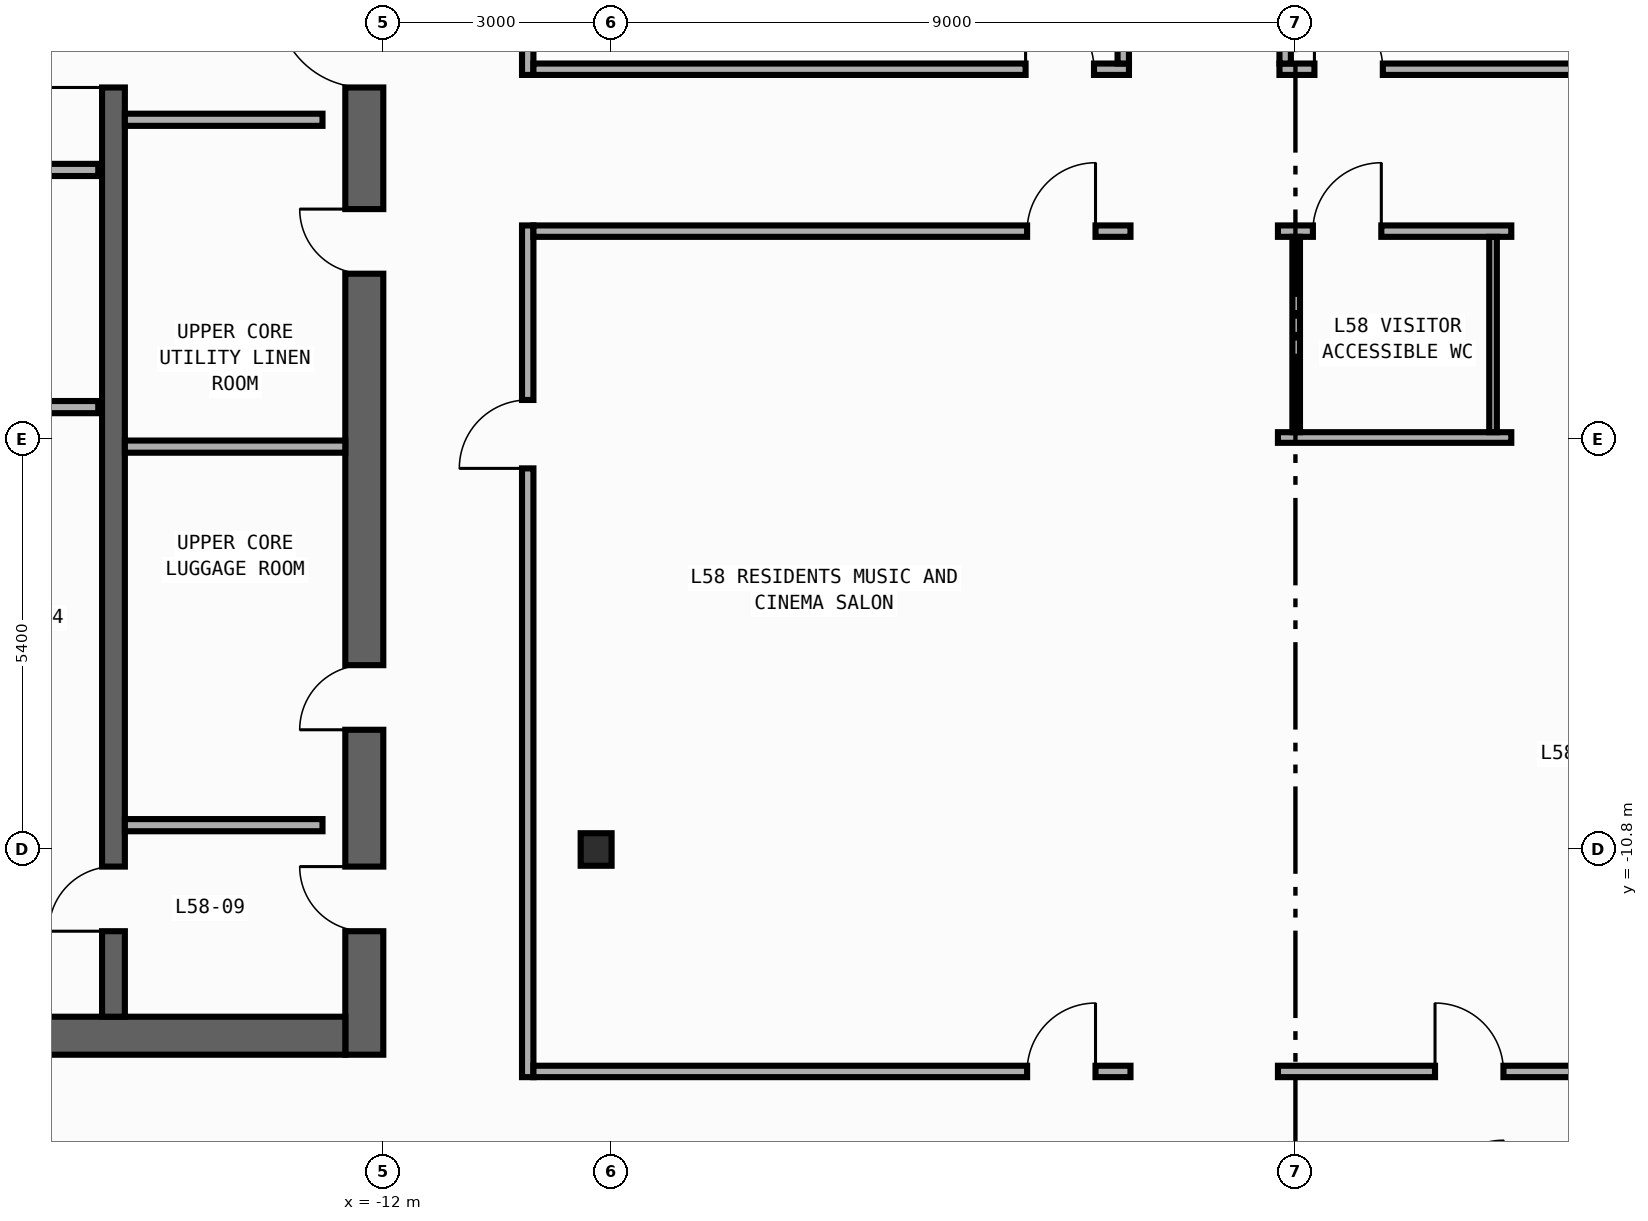
"""IFC4 building model, lengths in metres.
Left out: names, types, materials, properties, quantities, classifications, styles, units other than length and angle.
Written with IfcOpenShell. Run it as: python <this file> out.ifc"""

import sys

from ifc_helpers import new_model, si_unit, direction, frame, frame_2d, origin, origin_2d, place, context, subcontext, project, spatial, rectangle, i_section, extrude, element, fill, save


model = new_model("IFC4")
c1 = context("Model", 3, precision=1e-05, world=origin(), true_north=direction((0.0, 1.0)))
c2 = subcontext(c1, "Body", "Model", "MODEL_VIEW")
j1 = project(units=[si_unit("LENGTHUNIT", "METRE"), si_unit("PLANEANGLEUNIT", "RADIAN")], contexts=[c1])
p1 = place(None, origin())
s1 = spatial("IfcSite", under=j1, at=p1, CompositionType="ELEMENT")
p2 = place(p1, origin())
s2 = spatial("IfcBuilding", under=s1, at=p2, CompositionType="ELEMENT")
p3 = place(p2, frame((0.0, 0.0, 247.6)))
s3 = spatial("IfcBuildingStorey", under=s2, at=p3, CompositionType="ELEMENT", Elevation=247.6)
p4 = place(p3, frame((-12.25, -13.5, 0.0), z_axis=(0.0, 0.0, 1.0), x_axis=(0.0, 1.0, 0.0)))
e1 = element("IfcWall", 1, at=p4, inside=s3, PredefinedType="SHEAR", context=c2, shape_type="SweptSolid", body=[
    extrude(rectangle(XDim=27.0, YDim=0.5, at=frame_2d((13.5, 0.0))), origin(), (0.0, 0.0, 1.0), 3.34),
])
p5 = place(p4, frame((15.175, 0.0, 0.0)))
e2 = element("IfcOpeningElement", 2, at=p5, cuts=e1, PredefinedType="OPENING", context=c2, shape_type="SweptSolid", body=[
    extrude(rectangle(XDim=0.85, YDim=2.1, at=frame_2d((0.425, 1.05))), frame((0.0, 0.26, 0.0), z_axis=(0.0, -1.0, 0.0), x_axis=(1.0, 0.0, 0.0)), (0.0, 0.0, 1.0), 0.52),
])
p6 = place(p4, frame((21.275, 0.0, 0.0)))
e3 = element("IfcOpeningElement", 3, at=p6, cuts=e1, PredefinedType="OPENING", context=c2, shape_type="SweptSolid", body=[
    extrude(rectangle(XDim=0.85, YDim=2.1, at=frame_2d((0.425, 1.05))), frame((0.0, 0.26, 0.0), z_axis=(0.0, -1.0, 0.0), x_axis=(1.0, 0.0, 0.0)), (0.0, 0.0, 1.0), 0.52),
])
p7 = place(p4, frame((4.275, 0.0, 0.0)))
e4 = element("IfcOpeningElement", 4, at=p7, cuts=e1, PredefinedType="OPENING", context=c2, shape_type="SweptSolid", body=[
    extrude(rectangle(XDim=0.85, YDim=2.1, at=frame_2d((0.425, 1.05))), frame((0.0, 0.26, 0.0), z_axis=(0.0, -1.0, 0.0), x_axis=(1.0, 0.0, 0.0)), (0.0, 0.0, 1.0), 0.52),
])
p8 = place(p4, frame((10.275, 0.0, 0.0)))
e5 = element("IfcOpeningElement", 5, at=p8, cuts=e1, PredefinedType="OPENING", context=c2, shape_type="SweptSolid", body=[
    extrude(rectangle(XDim=0.85, YDim=2.1, at=frame_2d((0.425, 1.05))), frame((0.0, 0.26, 0.0), z_axis=(0.0, -1.0, 0.0), x_axis=(1.0, 0.0, 0.0)), (0.0, 0.0, 1.0), 0.52),
])
p9 = place(p4, frame((12.725, 0.0, 0.0)))
e6 = element("IfcOpeningElement", 6, at=p9, cuts=e1, PredefinedType="OPENING", context=c2, shape_type="SweptSolid", body=[
    extrude(rectangle(XDim=1.15, YDim=2.2, at=frame_2d((0.575, 1.1))), frame((0.0, 0.26, 0.0), z_axis=(0.0, -1.0, 0.0), x_axis=(1.0, 0.0, 0.0)), (0.0, 0.0, 1.0), 0.52),
])
p10 = place(p4, frame((1.625, 0.0, 0.0)))
e7 = element("IfcOpeningElement", 7, at=p10, cuts=e1, PredefinedType="OPENING", context=c2, shape_type="SweptSolid", body=[
    extrude(rectangle(XDim=0.85, YDim=2.1, at=frame_2d((0.425, 1.05))), frame((0.0, 0.26, 0.0), z_axis=(0.0, -1.0, 0.0), x_axis=(1.0, 0.0, 0.0)), (0.0, 0.0, 1.0), 0.52),
])
p11 = place(p3, frame((-19.9, -13.25, 0.0), z_axis=(0.0, 0.0, 1.0), x_axis=(1.0, 0.0, 0.0)))
e8 = element("IfcWall", 8, at=p11, inside=s3, PredefinedType="SHEAR", context=c2, shape_type="SweptSolid", body=[
    extrude(rectangle(XDim=7.4, YDim=0.5, at=frame_2d((3.7, 0.0))), origin(), (0.0, 0.0, 1.0), 3.34),
])
p12 = place(p3, frame((-15.55, -13.0, 0.0), z_axis=(0.0, 0.0, 1.0), x_axis=(0.0, 1.0, 0.0)))
e9 = element("IfcWall", 9, at=p12, inside=s3, PredefinedType="SHEAR", context=c2, shape_type="SweptSolid", body=[
    extrude(rectangle(XDim=26.0, YDim=0.3, at=frame_2d((13.0, 0.0))), origin(), (0.0, 0.0, 1.0), 3.34),
])
p13 = place(p12, frame((12.225, 0.0, 0.0)))
e10 = element("IfcOpeningElement", 10, at=p13, cuts=e9, PredefinedType="OPENING", context=c2, shape_type="SweptSolid", body=[
    extrude(rectangle(XDim=1.15, YDim=2.2, at=frame_2d((0.575, 1.1))), frame((0.0, 0.16, 0.0), z_axis=(0.0, -1.0, 0.0), x_axis=(1.0, 0.0, 0.0)), (0.0, 0.0, 1.0), 0.32),
])
p14 = place(p12, frame((1.125, 0.0, 0.0)))
e11 = element("IfcOpeningElement", 11, at=p14, cuts=e9, PredefinedType="OPENING", context=c2, shape_type="SweptSolid", body=[
    extrude(rectangle(XDim=0.85, YDim=2.1, at=frame_2d((0.425, 1.05))), frame((0.0, 0.16, 0.0), z_axis=(0.0, -1.0, 0.0), x_axis=(1.0, 0.0, 0.0)), (0.0, 0.0, 1.0), 0.32),
])
p15 = place(p3, frame((-9.2, -10.8, 0.0), z_axis=(0.0, 0.0, 1.0), x_axis=(1.0, 0.0, 0.0)))
e12 = element("IfcColumn", 12, at=p15, inside=s3, PredefinedType="COLUMN", context=c2, shape_type="SweptSolid", body=[
    extrude(i_section(OverallWidth=0.407, OverallDepth=0.428, WebThickness=0.02, FlangeThickness=0.035, FilletRadius=0.022, at=origin_2d()), origin(), (0.0, 0.0, 1.0), 3.6),
])
p16 = place(p3, frame((-19.55, -1.86, 0.0), z_axis=(0.0, 0.0, 1.0), x_axis=(1.0, 0.0, 0.0)))
e13 = element("IfcWall", 13, at=p16, inside=s3, PredefinedType="STANDARD", context=c2, shape_type="SweptSolid", body=[
    extrude(rectangle(XDim=3.8, YDim=0.16, at=frame_2d((1.9, 0.0))), origin(), (0.0, 0.0, 1.0), 3.34),
])
p17 = place(p16, frame((1.18, 0.0, 0.0)))
e14 = element("IfcOpeningElement", 14, at=p17, cuts=e13, PredefinedType="OPENING", context=c2, shape_type="SweptSolid", body=[
    extrude(rectangle(XDim=1.15, YDim=2.2, at=frame_2d((0.575, 1.1))), frame((0.0, 0.09, 0.0), z_axis=(0.0, -1.0, 0.0), x_axis=(1.0, 0.0, 0.0)), (0.0, 0.0, 1.0), 0.18),
])
p18 = place(p3, frame((-19.55, -4.98, 0.0), z_axis=(0.0, 0.0, 1.0), x_axis=(1.0, 0.0, 0.0)))
e15 = element("IfcWall", 15, at=p18, inside=s3, PredefinedType="STANDARD", context=c2, shape_type="SweptSolid", body=[
    extrude(rectangle(XDim=3.8, YDim=0.16, at=frame_2d((1.9, 0.0))), origin(), (0.0, 0.0, 1.0), 3.34),
])
for number, where, z_axis, x_axis in (
    (16, (-15.4, -1.2, 0.0), (0.0, 0.0, 1.0), (1.0, 0.0, 0.0)),
    (17, (-15.4, -10.48, 0.0), (0.0, 0.0, 1.0), (1.0, 0.0, 0.0)),
):
    element("IfcWall", number, at=place(p3, frame(where, z_axis=z_axis, x_axis=x_axis)), inside=s3, PredefinedType="STANDARD", context=c2, shape_type="SweptSolid", body=[
        extrude(rectangle(XDim=2.6, YDim=0.16, at=frame_2d((1.3, 0.0))), origin(), (0.0, 0.0, 1.0), 3.34),
    ])
p19 = place(p3, frame((-15.4, -5.5, 0.0), z_axis=(0.0, 0.0, 1.0), x_axis=(1.0, 0.0, 0.0)))
e18 = element("IfcWall", 18, at=p19, inside=s3, PredefinedType="PARTITIONING", context=c2, shape_type="SweptSolid", body=[
    extrude(rectangle(XDim=2.9, YDim=0.16, at=frame_2d((1.45, 0.0))), origin(), (0.0, 0.0, 1.0), 3.34),
])
p20 = place(p3, frame((-10.1, -0.61, 0.0), z_axis=(0.0, 0.0, 1.0), x_axis=(0.0, 1.0, 0.0)))
e19 = element("IfcWall", 19, at=p20, inside=s3, PredefinedType="PARTITIONING", context=c2, shape_type="SweptSolid", body=[
    extrude(rectangle(XDim=14.405, YDim=0.15, at=frame_2d((7.203, 0.0))), origin(), (0.0, 0.0, 1.0), 3.34),
])
p21 = place(p20, frame((5.535, 0.0, 0.0)))
e20 = element("IfcOpeningElement", 20, at=p21, cuts=e19, PredefinedType="OPENING", context=c2, shape_type="SweptSolid", body=[
    extrude(rectangle(XDim=0.9, YDim=2.15, at=frame_2d((0.45, 1.075))), frame((0.0, 0.085, 0.0), z_axis=(0.0, -1.0, 0.0), x_axis=(1.0, 0.0, 0.0)), (0.0, 0.0, 1.0), 0.17),
])
p22 = place(p3, frame((-10.1, -13.795, 0.0), z_axis=(0.0, 0.0, 1.0), x_axis=(0.0, 1.0, 0.0)))
e21 = element("IfcWall", 21, at=p22, inside=s3, PredefinedType="PARTITIONING", context=c2, shape_type="SweptSolid", body=[
    extrude(rectangle(XDim=11.205, YDim=0.15, at=frame_2d((5.603, 0.0))), origin(), (0.0, 0.0, 1.0), 3.34),
])
p23 = place(p22, frame((8.009, 0.0, 0.0)))
e22 = element("IfcOpeningElement", 22, at=p23, cuts=e21, PredefinedType="OPENING", context=c2, shape_type="SweptSolid", body=[
    extrude(rectangle(XDim=0.9, YDim=2.15, at=frame_2d((0.45, 1.075))), frame((0.0, 0.085, 0.0), z_axis=(0.0, -1.0, 0.0), x_axis=(1.0, 0.0, 0.0)), (0.0, 0.0, 1.0), 0.17),
])
p24 = place(p3, frame((-10.025, -0.535, 0.0), z_axis=(0.0, 0.0, 1.0), x_axis=(1.0, 0.0, 0.0)))
e23 = element("IfcWall", 23, at=p24, inside=s3, PredefinedType="PARTITIONING", context=c2, shape_type="SweptSolid", body=[
    extrude(rectangle(XDim=7.835, YDim=0.15, at=frame_2d((3.917, 0.0))), origin(), (0.0, 0.0, 1.0), 3.34),
])
p25 = place(p24, frame((6.475, 0.0, 0.0)))
e24 = element("IfcOpeningElement", 24, at=p25, cuts=e23, PredefinedType="OPENING", context=c2, shape_type="SweptSolid", body=[
    extrude(rectangle(XDim=0.9, YDim=2.15, at=frame_2d((0.45, 1.075))), frame((0.0, 0.085, 0.0), z_axis=(0.0, -1.0, 0.0), x_axis=(1.0, 0.0, 0.0)), (0.0, 0.0, 1.0), 0.17),
])
p26 = place(p3, frame((-10.025, -2.665, 0.0), z_axis=(0.0, 0.0, 1.0), x_axis=(1.0, 0.0, 0.0)))
e25 = element("IfcWall", 25, at=p26, inside=s3, PredefinedType="PARTITIONING", context=c2, shape_type="SweptSolid", body=[
    extrude(rectangle(XDim=7.855, YDim=0.15, at=frame_2d((3.927, 0.0))), origin(), (0.0, 0.0, 1.0), 3.34),
])
p27 = place(p26, frame((6.495, 0.0, 0.0)))
e26 = element("IfcOpeningElement", 26, at=p27, cuts=e25, PredefinedType="OPENING", context=c2, shape_type="SweptSolid", body=[
    extrude(rectangle(XDim=0.9, YDim=2.15, at=frame_2d((0.45, 1.075))), frame((0.0, 0.085, 0.0), z_axis=(0.0, -1.0, 0.0), x_axis=(1.0, 0.0, 0.0)), (0.0, 0.0, 1.0), 0.17),
])
p28 = place(p3, frame((-0.21, -0.535, 0.0), z_axis=(0.0, 0.0, 1.0), x_axis=(1.0, 0.0, 0.0)))
e27 = element("IfcWall", 27, at=p28, inside=s3, PredefinedType="PARTITIONING", context=c2, shape_type="SweptSolid", body=[
    extrude(rectangle(XDim=10.235, YDim=0.15, at=frame_2d((5.117, 0.0))), origin(), (0.0, 0.0, 1.0), 3.34),
])
p29 = place(p28, frame((0.46, 0.0, 0.0)))
e28 = element("IfcOpeningElement", 28, at=p29, cuts=e27, PredefinedType="OPENING", context=c2, shape_type="SweptSolid", body=[
    extrude(rectangle(XDim=0.9, YDim=2.15, at=frame_2d((0.45, 1.075))), frame((0.0, 0.085, 0.0), z_axis=(0.0, -1.0, 0.0), x_axis=(1.0, 0.0, 0.0)), (0.0, 0.0, 1.0), 0.17),
])
p30 = place(p3, frame((-0.23, -2.665, 0.0), z_axis=(0.0, 0.0, 1.0), x_axis=(1.0, 0.0, 0.0)))
e29 = element("IfcWall", 29, at=p30, inside=s3, PredefinedType="PARTITIONING", context=c2, shape_type="SweptSolid", body=[
    extrude(rectangle(XDim=3.07, YDim=0.15, at=frame_2d((1.535, 0.0))), origin(), (0.0, 0.0, 1.0), 3.34),
])
p31 = place(p30, frame((0.46, 0.0, 0.0)))
e30 = element("IfcOpeningElement", 30, at=p31, cuts=e29, PredefinedType="OPENING", context=c2, shape_type="SweptSolid", body=[
    extrude(rectangle(XDim=0.9, YDim=2.15, at=frame_2d((0.45, 1.075))), frame((0.0, 0.085, 0.0), z_axis=(0.0, -1.0, 0.0), x_axis=(1.0, 0.0, 0.0)), (0.0, 0.0, 1.0), 0.17),
])
p32 = place(p3, frame((-2.265, -0.46, 0.0), z_axis=(0.0, 0.0, 1.0), x_axis=(0.0, 1.0, 0.0)))
e31 = element("IfcWall", 31, at=p32, inside=s3, PredefinedType="PARTITIONING", context=c2, shape_type="SweptSolid", body=[
    extrude(rectangle(XDim=14.255, YDim=0.15, at=frame_2d((7.127, 0.0))), origin(), (0.0, 0.0, 1.0), 3.34),
])
p33 = place(p32, frame((5.474, 0.0, 0.0)))
e32 = element("IfcOpeningElement", 32, at=p33, cuts=e31, PredefinedType="OPENING", context=c2, shape_type="SweptSolid", body=[
    extrude(rectangle(XDim=0.9, YDim=2.15, at=frame_2d((0.45, 1.075))), frame((0.0, 0.085, 0.0), z_axis=(0.0, -1.0, 0.0), x_axis=(1.0, 0.0, 0.0)), (0.0, 0.0, 1.0), 0.17),
])
p34 = place(p3, frame((-0.135, -0.46, 0.0), z_axis=(0.0, 0.0, 1.0), x_axis=(0.0, 1.0, 0.0)))
e33 = element("IfcWall", 33, at=p34, inside=s3, PredefinedType="PARTITIONING", context=c2, shape_type="SweptSolid", body=[
    extrude(rectangle(XDim=14.255, YDim=0.15, at=frame_2d((7.127, 0.0))), origin(), (0.0, 0.0, 1.0), 3.34),
])
p35 = place(p34, frame((5.474, 0.0, 0.0)))
e34 = element("IfcOpeningElement", 34, at=p35, cuts=e33, PredefinedType="OPENING", context=c2, shape_type="SweptSolid", body=[
    extrude(rectangle(XDim=0.9, YDim=2.15, at=frame_2d((0.45, 1.075))), frame((0.0, 0.085, 0.0), z_axis=(0.0, -1.0, 0.0), x_axis=(1.0, 0.0, 0.0)), (0.0, 0.0, 1.0), 0.17),
])
p36 = place(p3, frame((-10.025, -13.72, 0.0), z_axis=(0.0, 0.0, 1.0), x_axis=(1.0, 0.0, 0.0)))
e35 = element("IfcWall", 35, at=p36, inside=s3, PredefinedType="PARTITIONING", context=c2, shape_type="SweptSolid", body=[
    extrude(rectangle(XDim=7.855, YDim=0.15, at=frame_2d((3.927, 0.0))), origin(), (0.0, 0.0, 1.0), 3.34),
])
p37 = place(p36, frame((6.495, 0.0, 0.0)))
e36 = element("IfcOpeningElement", 36, at=p37, cuts=e35, PredefinedType="OPENING", context=c2, shape_type="SweptSolid", body=[
    extrude(rectangle(XDim=0.9, YDim=2.15, at=frame_2d((0.45, 1.075))), frame((0.0, 0.085, 0.0), z_axis=(0.0, -1.0, 0.0), x_axis=(1.0, 0.0, 0.0)), (0.0, 0.0, 1.0), 0.17),
])
p38 = place(p3, frame((-0.23, -13.72, 0.0), z_axis=(0.0, 0.0, 1.0), x_axis=(1.0, 0.0, 0.0)))
e37 = element("IfcWall", 37, at=p38, inside=s3, PredefinedType="PARTITIONING", context=c2, shape_type="SweptSolid", body=[
    extrude(rectangle(XDim=10.255, YDim=0.15, at=frame_2d((5.127, 0.0))), origin(), (0.0, 0.0, 1.0), 3.34),
])
p39 = place(p38, frame((2.067, 0.0, 0.0)))
e38 = element("IfcOpeningElement", 38, at=p39, cuts=e37, PredefinedType="OPENING", context=c2, shape_type="SweptSolid", body=[
    extrude(rectangle(XDim=0.9, YDim=2.15, at=frame_2d((0.45, 1.075))), frame((0.0, 0.085, 0.0), z_axis=(0.0, -1.0, 0.0), x_axis=(1.0, 0.0, 0.0)), (0.0, 0.0, 1.0), 0.17),
])
p40 = place(p3, frame((-0.23, -5.38, 0.0), z_axis=(0.0, 0.0, 1.0), x_axis=(1.0, 0.0, 0.0)))
e39 = element("IfcWall", 39, at=p40, inside=s3, PredefinedType="PARTITIONING", context=c2, shape_type="SweptSolid", body=[
    extrude(rectangle(XDim=3.07, YDim=0.14, at=frame_2d((1.535, 0.0))), origin(), (0.0, 0.0, 1.0), 3.34),
])
for number, where, z_axis, x_axis in (
    (40, (2.6, -2.74, 0.0), (0.0, 0.0, 1.0), (0.0, -1.0, 0.0)),
    (41, (0.01, -5.31, 0.0), (0.0, 0.0, 1.0), (0.0, 1.0, 0.0)),
):
    element("IfcWall", number, at=place(p3, frame(where, z_axis=z_axis, x_axis=x_axis)), inside=s3, PredefinedType="PARTITIONING", context=c2, shape_type="SweptSolid", body=[
        extrude(rectangle(XDim=2.57, YDim=0.1, at=frame_2d((1.285, 0.0))), origin(), (0.0, 0.0, 1.0), 3.34),
    ])
p41 = place(p7, origin())
e42 = element("IfcDoor", 42, at=p41, inside=s3, OperationType="SINGLE_SWING_LEFT", PredefinedType="DOOR", context=c2, shape_type="SweptSolid", body=[
    extrude(rectangle(XDim=0.85, YDim=2.1, at=frame_2d((0.425, 1.05))), frame((0.0, 0.025, 0.0), z_axis=(0.0, -1.0, 0.0), x_axis=(1.0, 0.0, 0.0)), (0.0, 0.0, 1.0), 0.05),
])
fill(e4, e42)
p42 = place(p8, origin())
e43 = element("IfcDoor", 43, at=p42, inside=s3, OperationType="SINGLE_SWING_RIGHT", PredefinedType="DOOR", context=c2, shape_type="SweptSolid", body=[
    extrude(rectangle(XDim=0.85, YDim=2.1, at=frame_2d((0.425, 1.05))), frame((0.0, 0.025, 0.0), z_axis=(0.0, -1.0, 0.0), x_axis=(1.0, 0.0, 0.0)), (0.0, 0.0, 1.0), 0.05),
])
fill(e5, e43)
p43 = place(p9, origin())
e44 = element("IfcDoor", 44, at=p43, inside=s3, OperationType="SINGLE_SWING_RIGHT", PredefinedType="DOOR", context=c2, shape_type="SweptSolid", body=[
    extrude(rectangle(XDim=1.15, YDim=2.2, at=frame_2d((0.575, 1.1))), frame((0.0, 0.025, 0.0), z_axis=(0.0, -1.0, 0.0), x_axis=(1.0, 0.0, 0.0)), (0.0, 0.0, 1.0), 0.05),
])
fill(e6, e44)
p44 = place(p13, origin())
e45 = element("IfcDoor", 45, at=p44, inside=s3, OperationType="SINGLE_SWING_LEFT", PredefinedType="DOOR", context=c2, shape_type="SweptSolid", body=[
    extrude(rectangle(XDim=1.15, YDim=2.2, at=frame_2d((0.575, 1.1))), frame((0.0, 0.025, 0.0), z_axis=(0.0, -1.0, 0.0), x_axis=(1.0, 0.0, 0.0)), (0.0, 0.0, 1.0), 0.05),
])
fill(e10, e45)
p45 = place(p10, origin())
e46 = element("IfcDoor", 46, at=p45, inside=s3, OperationType="SINGLE_SWING_RIGHT", PredefinedType="DOOR", context=c2, shape_type="SweptSolid", body=[
    extrude(rectangle(XDim=0.85, YDim=2.1, at=frame_2d((0.425, 1.05))), frame((0.0, 0.025, 0.0), z_axis=(0.0, -1.0, 0.0), x_axis=(1.0, 0.0, 0.0)), (0.0, 0.0, 1.0), 0.05),
])
fill(e7, e46)
p46 = place(p14, origin())
e47 = element("IfcDoor", 47, at=p46, inside=s3, OperationType="SINGLE_SWING_LEFT", PredefinedType="DOOR", context=c2, shape_type="SweptSolid", body=[
    extrude(rectangle(XDim=0.85, YDim=2.1, at=frame_2d((0.425, 1.05))), frame((0.0, 0.025, 0.0), z_axis=(0.0, -1.0, 0.0), x_axis=(1.0, 0.0, 0.0)), (0.0, 0.0, 1.0), 0.05),
])
fill(e11, e47)
p47 = place(p23, origin())
e48 = element("IfcDoor", 48, at=p47, inside=s3, OperationType="SINGLE_SWING_LEFT", PredefinedType="DOOR", context=c2, shape_type="SweptSolid", body=[
    extrude(rectangle(XDim=0.9, YDim=2.15, at=frame_2d((0.45, 1.075))), frame((0.0, 0.025, 0.0), z_axis=(0.0, -1.0, 0.0), x_axis=(1.0, 0.0, 0.0)), (0.0, 0.0, 1.0), 0.05),
])
fill(e22, e48)
p48 = place(p25, origin())
e49 = element("IfcDoor", 49, at=p48, inside=s3, OperationType="SINGLE_SWING_LEFT", PredefinedType="DOOR", context=c2, shape_type="SweptSolid", body=[
    extrude(rectangle(XDim=0.9, YDim=2.15, at=frame_2d((0.45, 1.075))), frame((0.0, 0.025, 0.0), z_axis=(0.0, -1.0, 0.0), x_axis=(1.0, 0.0, 0.0)), (0.0, 0.0, 1.0), 0.05),
])
fill(e24, e49)
p49 = place(p27, origin())
e50 = element("IfcDoor", 50, at=p49, inside=s3, OperationType="SINGLE_SWING_RIGHT", PredefinedType="DOOR", context=c2, shape_type="SweptSolid", body=[
    extrude(rectangle(XDim=0.9, YDim=2.15, at=frame_2d((0.45, 1.075))), frame((0.0, 0.025, 0.0), z_axis=(0.0, -1.0, 0.0), x_axis=(1.0, 0.0, 0.0)), (0.0, 0.0, 1.0), 0.05),
])
fill(e26, e50)
p50 = place(p29, origin())
e51 = element("IfcDoor", 51, at=p50, inside=s3, OperationType="SINGLE_SWING_LEFT", PredefinedType="DOOR", context=c2, shape_type="SweptSolid", body=[
    extrude(rectangle(XDim=0.9, YDim=2.15, at=frame_2d((0.45, 1.075))), frame((0.0, 0.025, 0.0), z_axis=(0.0, -1.0, 0.0), x_axis=(1.0, 0.0, 0.0)), (0.0, 0.0, 1.0), 0.05),
])
fill(e28, e51)
p51 = place(p31, origin())
e52 = element("IfcDoor", 52, at=p51, inside=s3, OperationType="SINGLE_SWING_RIGHT", PredefinedType="DOOR", context=c2, shape_type="SweptSolid", body=[
    extrude(rectangle(XDim=0.9, YDim=2.15, at=frame_2d((0.45, 1.075))), frame((0.0, 0.025, 0.0), z_axis=(0.0, -1.0, 0.0), x_axis=(1.0, 0.0, 0.0)), (0.0, 0.0, 1.0), 0.05),
])
fill(e30, e52)
p52 = place(p37, origin())
e53 = element("IfcDoor", 53, at=p52, inside=s3, OperationType="SINGLE_SWING_RIGHT", PredefinedType="DOOR", context=c2, shape_type="SweptSolid", body=[
    extrude(rectangle(XDim=0.9, YDim=2.15, at=frame_2d((0.45, 1.075))), frame((0.0, 0.025, 0.0), z_axis=(0.0, -1.0, 0.0), x_axis=(1.0, 0.0, 0.0)), (0.0, 0.0, 1.0), 0.05),
])
fill(e36, e53)
p53 = place(p39, origin())
e54 = element("IfcDoor", 54, at=p53, inside=s3, OperationType="SINGLE_SWING_LEFT", PredefinedType="DOOR", context=c2, shape_type="SweptSolid", body=[
    extrude(rectangle(XDim=0.9, YDim=2.15, at=frame_2d((0.45, 1.075))), frame((0.0, 0.025, 0.0), z_axis=(0.0, -1.0, 0.0), x_axis=(1.0, 0.0, 0.0)), (0.0, 0.0, 1.0), 0.05),
])
fill(e38, e54)
save(model, sys.argv[1])
